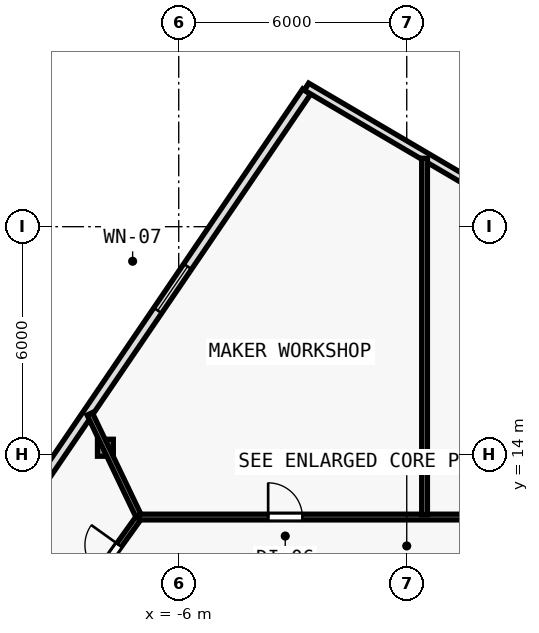
"""IFC4 building model, lengths in metres.
Left out: names, types, materials, properties, quantities, classifications, styles, units other than length and angle.
Written with IfcOpenShell. Run it as: python <this file> out.ifc"""

import sys

from ifc_helpers import new_model, si_unit, direction, frame, frame_2d, origin, origin_2d, place, context, subcontext, project, spatial, rectangle, i_section, extrude, element, fill, save


model = new_model("IFC4")
c1 = context("Model", 3, precision=1e-05, world=origin(), true_north=direction((0.0, 1.0)))
c2 = subcontext(c1, "Body", "Model", "MODEL_VIEW")
j1 = project(units=[si_unit("LENGTHUNIT", "METRE"), si_unit("PLANEANGLEUNIT", "RADIAN")], contexts=[c1])
p1 = place(None, origin())
s1 = spatial("IfcSite", under=j1, at=p1, CompositionType="ELEMENT")
p2 = place(p1, origin())
s2 = spatial("IfcBuilding", under=s1, at=p2, CompositionType="ELEMENT")
p3 = place(p2, frame((0.0, 0.0, 33.6)))
s3 = spatial("IfcBuildingStorey", under=s2, at=p3, CompositionType="ELEMENT", Elevation=33.6)
p4 = place(p3, frame((-7.929, 14.183, 0.005), z_axis=(0.008774547672, -0.002516730728, 0.999958335822), x_axis=(0.275705143097, 0.961242255662, 0.0)))
e1 = element("IfcColumn", 1, at=p4, inside=s3, PredefinedType="COLUMN", context=c2, shape_type="SweptSolid", body=[
    extrude(i_section(OverallWidth=0.416, OverallDepth=0.446, WebThickness=0.025, FlangeThickness=0.04, FilletRadius=0.015, at=origin_2d()), origin(), (0.0, 0.0, 1.0), 3.589),
])
p5 = place(p3, frame((-9.684, 13.191, 0.0), z_axis=(0.0, 0.0, 1.0), x_axis=(0.562473549685, 0.826815279192, 0.0)))
e2 = element("IfcWall", 2, at=p5, inside=s3, PredefinedType="SOLIDWALL", context=c2, shape_type="SweptSolid", body=[
    extrude(rectangle(XDim=12.536, YDim=0.25, at=frame_2d((6.268, 0.0))), origin(), (0.0, 0.0, 1.0), 3.35),
])
p6 = place(p5, frame((5.568, 0.0, 0.62)))
e3 = element("IfcOpeningElement", 3, at=p6, cuts=e2, PredefinedType="OPENING", context=c2, shape_type="SweptSolid", body=[
    extrude(rectangle(XDim=1.4, YDim=2.0, at=frame_2d((0.7, 1.0))), frame((0.0, 0.135, 0.0), z_axis=(0.0, -1.0, 0.0), x_axis=(1.0, 0.0, 0.0)), (0.0, 0.0, 1.0), 0.27),
])
p7 = place(p3, frame((-2.635, 23.681, 0.0), z_axis=(0.0, 0.0, 1.0), x_axis=(0.862126841454, -0.506692519428, 0.0)))
e4 = element("IfcWall", 4, at=p7, inside=s3, PredefinedType="SOLIDWALL", context=c2, shape_type="SweptSolid", body=[
    extrude(rectangle(XDim=5.439, YDim=0.22, at=frame_2d((2.72, 0.0))), origin(), (0.0, 0.0, 1.0), 3.35),
])
p8 = place(p3, frame((-9.86, 8.426, 0.0), z_axis=(0.0, 0.0, 1.0), x_axis=(0.582449511476, 0.812866881218, 0.0)))
e5 = element("IfcWall", 5, at=p8, inside=s3, PredefinedType="PARTITIONING", context=c2, shape_type="SweptSolid", body=[
    extrude(rectangle(XDim=4.84, YDim=0.15, at=frame_2d((2.42, 0.0))), origin(), (0.0, 0.0, 1.0), 2.725),
])
p9 = place(p8, frame((3.035, 0.0, 0.0)))
e6 = element("IfcOpeningElement", 6, at=p9, cuts=e5, PredefinedType="OPENING", context=c2, shape_type="SweptSolid", body=[
    extrude(rectangle(XDim=0.9, YDim=2.1, at=frame_2d((0.45, 1.05))), frame((0.0, 0.085, 0.0), z_axis=(0.0, -1.0, 0.0), x_axis=(1.0, 0.0, 0.0)), (0.0, 0.0, 1.0), 0.17),
])
p10 = place(p3, frame((-7.041, 12.36, 0.0), z_axis=(0.0, 0.0, 1.0), x_axis=(1.0, 0.0, 0.0)))
e7 = element("IfcWall", 7, at=p10, inside=s3, PredefinedType="PARTITIONING", context=c2, shape_type="SweptSolid", body=[
    extrude(rectangle(XDim=14.082, YDim=0.15, at=frame_2d((7.041, 0.0))), origin(), (0.0, 0.0, 1.0), 3.35),
])
p11 = place(p10, frame((10.257, 0.0, 0.0)))
e8 = element("IfcOpeningElement", 8, at=p11, cuts=e7, PredefinedType="OPENING", context=c2, shape_type="SweptSolid", body=[
    extrude(rectangle(XDim=0.9, YDim=2.1, at=frame_2d((0.45, 1.05))), frame((0.0, 0.085, 0.0), z_axis=(0.0, -1.0, 0.0), x_axis=(1.0, 0.0, 0.0)), (0.0, 0.0, 1.0), 0.17),
])
p12 = place(p10, frame((3.394, 0.0, 0.0)))
e9 = element("IfcOpeningElement", 9, at=p12, cuts=e7, PredefinedType="OPENING", context=c2, shape_type="SweptSolid", body=[
    extrude(rectangle(XDim=0.9, YDim=2.1, at=frame_2d((0.45, 1.05))), frame((0.0, 0.085, 0.0), z_axis=(0.0, -1.0, 0.0), x_axis=(1.0, 0.0, 0.0)), (0.0, 0.0, 1.0), 0.17),
])
p13 = place(p3, frame((-7.064, 12.404, 0.0), z_axis=(0.0, 0.0, 1.0), x_axis=(-0.431808559167, 0.901965281056, 0.0)))
e10 = element("IfcWall", 10, at=p13, inside=s3, PredefinedType="PARTITIONING", context=c2, shape_type="SweptSolid", body=[
    extrude(rectangle(XDim=2.96, YDim=0.15, at=frame_2d((1.48, 0.0))), origin(), (0.0, 0.0, 1.0), 2.725),
])
p14 = place(p3, frame((0.469, 12.42, 0.0), z_axis=(0.0, 0.0, 1.0), x_axis=(0.0, 1.0, 0.0)))
e11 = element("IfcWall", 11, at=p14, inside=s3, PredefinedType="PARTITIONING", context=c2, shape_type="SweptSolid", body=[
    extrude(rectangle(XDim=9.379, YDim=0.15, at=frame_2d((4.69, 0.0))), origin(), (0.0, 0.0, 1.0), 2.735),
])
p15 = place(p6, origin())
e12 = element("IfcWindow", 12, at=p15, inside=s3, PartitioningType="SINGLE_PANEL", PredefinedType="WINDOW", context=c2, shape_type="SweptSolid", body=[
    extrude(rectangle(XDim=1.4, YDim=2.0, at=frame_2d((0.7, 1.0))), frame((0.0, 0.03, 0.0), z_axis=(0.0, -1.0, 0.0), x_axis=(1.0, 0.0, 0.0)), (0.0, 0.0, 1.0), 0.06),
])
fill(e3, e12)
p16 = place(p12, origin())
e13 = element("IfcDoor", 13, at=p16, inside=s3, OperationType="SINGLE_SWING_LEFT", PredefinedType="DOOR", context=c2, shape_type="SweptSolid", body=[
    extrude(rectangle(XDim=0.9, YDim=2.1, at=frame_2d((0.45, 1.05))), frame((0.0, 0.025, 0.0), z_axis=(0.0, -1.0, 0.0), x_axis=(1.0, 0.0, 0.0)), (0.0, 0.0, 1.0), 0.05),
])
fill(e9, e13)
p17 = place(p9, origin())
e14 = element("IfcDoor", 14, at=p17, inside=s3, OperationType="SINGLE_SWING_RIGHT", PredefinedType="DOOR", context=c2, shape_type="SweptSolid", body=[
    extrude(rectangle(XDim=0.9, YDim=2.1, at=frame_2d((0.45, 1.05))), frame((0.0, 0.025, 0.0), z_axis=(0.0, -1.0, 0.0), x_axis=(1.0, 0.0, 0.0)), (0.0, 0.0, 1.0), 0.05),
])
fill(e6, e14)
save(model, sys.argv[1])
